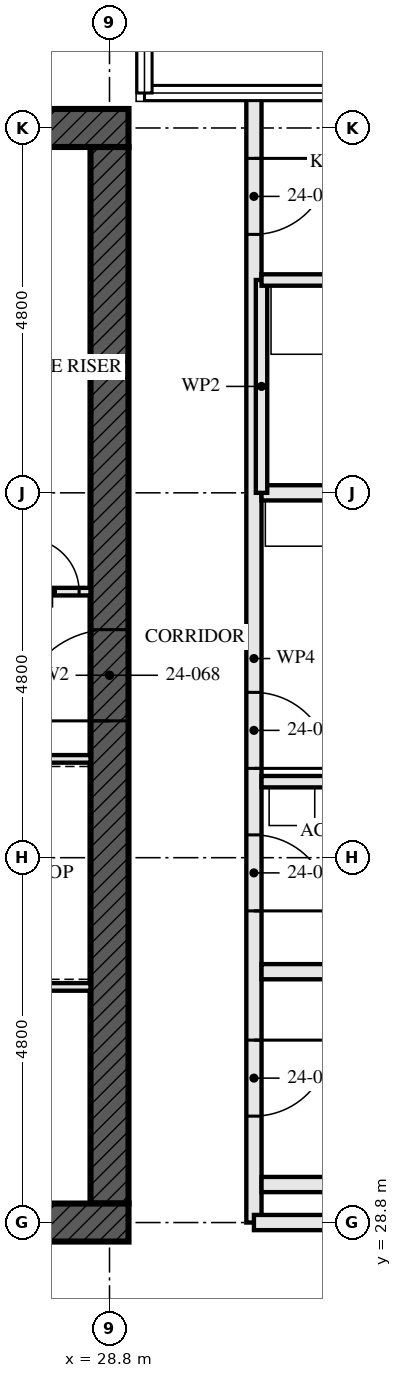
"""IFC4 building model, lengths in metres.
Left out: names, types, materials, properties, quantities, classifications, styles, units other than length and angle.
Written with IfcOpenShell. Run it as: python <this file> out.ifc"""

import sys

from ifc_helpers import new_model, si_unit, direction, frame, frame_2d, origin, place, context, subcontext, project, spatial, rectangle, extrude, element, fill, save


model = new_model("IFC4")
c1 = context("Model", 3, precision=1e-05, world=origin(), true_north=direction((0.0, 1.0)))
c2 = subcontext(c1, "Body", "Model", "MODEL_VIEW")
j1 = project(units=[si_unit("LENGTHUNIT", "METRE"), si_unit("PLANEANGLEUNIT", "RADIAN")], contexts=[c1])
p1 = place(None, origin())
s1 = spatial("IfcSite", under=j1, at=p1, CompositionType="ELEMENT")
p2 = place(p1, origin())
s2 = spatial("IfcBuilding", under=s1, at=p2, CompositionType="ELEMENT")
p3 = place(p2, frame((0.0, 0.0, 91.0)))
s3 = spatial("IfcBuildingStorey", under=s2, at=p3, CompositionType="ELEMENT", Elevation=91.0)
p4 = place(p3, frame((14.15, 28.8, -0.17), z_axis=(0.0, 0.0, 1.0), x_axis=(1.0, 0.0, 0.0)))
e1 = element("IfcWall", 1, at=p4, inside=s3, PredefinedType="SHEAR", context=c2, shape_type="SweptSolid", body=[
    extrude(rectangle(XDim=14.9, YDim=0.5, at=frame_2d((7.45, 0.0))), origin(), (0.0, 0.0, 1.0), 3.5),
])
p5 = place(p4, frame((6.85, 0.0, 0.17)))
e2 = element("IfcOpeningElement", 2, at=p5, cuts=e1, PredefinedType="OPENING", context=c2, shape_type="SweptSolid", body=[
    extrude(rectangle(XDim=1.2, YDim=2.1, at=frame_2d((0.6, 1.05))), frame((0.0, 0.26, 0.0), z_axis=(0.0, -1.0, 0.0), x_axis=(1.0, 0.0, 0.0)), (0.0, 0.0, 1.0), 0.521),
])
p6 = place(p3, frame((29.05, 43.2, -0.17), z_axis=(0.0, 0.0, 1.0), x_axis=(-1.0, 0.0, 0.0)))
e3 = element("IfcWall", 3, at=p6, inside=s3, PredefinedType="SHEAR", context=c2, shape_type="SweptSolid", body=[
    extrude(rectangle(XDim=14.9, YDim=0.5, at=frame_2d((7.45, 0.0))), origin(), (0.0, 0.0, 1.0), 3.5),
])
p7 = place(p6, frame((6.85, 0.0, 0.17)))
e4 = element("IfcOpeningElement", 4, at=p7, cuts=e3, PredefinedType="OPENING", context=c2, shape_type="SweptSolid", body=[
    extrude(rectangle(XDim=1.2, YDim=2.1, at=frame_2d((0.6, 1.05))), frame((0.0, 0.26, 0.0), z_axis=(0.0, -1.0, 0.0), x_axis=(1.0, 0.0, 0.0)), (0.0, 0.0, 1.0), 0.521),
])
p8 = place(p3, frame((28.8, 29.05, -0.17), z_axis=(0.0, 0.0, 1.0), x_axis=(0.0, 1.0, 0.0)))
e5 = element("IfcWall", 5, at=p8, inside=s3, PredefinedType="SHEAR", context=c2, shape_type="SweptSolid", body=[
    extrude(rectangle(XDim=13.9, YDim=0.5, at=frame_2d((6.95, 0.0))), origin(), (0.0, 0.0, 1.0), 3.5),
])
p9 = place(p8, frame((6.35, 0.0, 0.17)))
e6 = element("IfcOpeningElement", 6, at=p9, cuts=e5, PredefinedType="OPENING", context=c2, shape_type="SweptSolid", body=[
    extrude(rectangle(XDim=1.2, YDim=2.1, at=frame_2d((0.6, 1.05))), frame((0.0, 0.26, 0.0), z_axis=(0.0, -1.0, 0.0), x_axis=(1.0, 0.0, 0.0)), (0.0, 0.0, 1.0), 0.521),
])
for number, where, z_axis, x_axis in (
    (7, (35.5, 29.3, 0.0), (0.0, 0.0, 1.0), (-1.0, 0.0, 0.0)),
    (8, (35.5, 32.1, 0.0), (0.0, 0.0, 1.0), (-1.0, 0.0, 0.0)),
):
    element("IfcWall", number, at=place(p3, frame(where, z_axis=z_axis, x_axis=x_axis)), inside=s3, PredefinedType="SOLIDWALL", context=c2, shape_type="SweptSolid", body=[
        extrude(rectangle(XDim=4.7, YDim=0.2, at=frame_2d((2.35, 0.0))), origin(), (0.0, 0.0, 1.0), 2.99),
    ])
p10 = place(p3, frame((33.8, 34.6, 0.0), z_axis=(0.0, 0.0, 1.0), x_axis=(-1.0, 0.0, 0.0)))
e9 = element("IfcWall", 9, at=p10, inside=s3, PredefinedType="PARTITIONING", context=c2, shape_type="SweptSolid", body=[
    extrude(rectangle(XDim=3.0, YDim=0.15, at=frame_2d((1.5, 0.0))), origin(), (0.0, 0.0, 1.0), 3.33),
])
p11 = place(p3, frame((38.055, 38.4, 0.0), z_axis=(0.0, 0.0, 1.0), x_axis=(-1.0, 0.0, 0.0)))
e10 = element("IfcWall", 10, at=p11, inside=s3, PredefinedType="PARTITIONING", context=c2, shape_type="SweptSolid", body=[
    extrude(rectangle(XDim=7.255, YDim=0.2, at=frame_2d((3.627, 0.0))), origin(), (0.0, 0.0, 1.0), 2.55),
])
p12 = place(p3, frame((33.8, 41.2, 0.0), z_axis=(0.0, 0.0, 1.0), x_axis=(-1.0, 0.0, 0.0)))
e11 = element("IfcWall", 11, at=p12, inside=s3, PredefinedType="PARTITIONING", context=c2, shape_type="SweptSolid", body=[
    extrude(rectangle(XDim=3.0, YDim=0.15, at=frame_2d((1.5, 0.0))), origin(), (0.0, 0.0, 1.0), 3.33),
])
p13 = place(p3, frame((30.8, 38.4, 0.0), z_axis=(0.0, 0.0, 1.0), x_axis=(0.0, 1.0, 0.0)))
e12 = element("IfcWall", 12, at=p13, inside=s3, PredefinedType="PARTITIONING", context=c2, shape_type="SweptSolid", body=[
    extrude(rectangle(XDim=2.8, YDim=0.15, at=frame_2d((1.4, 0.0))), origin(), (0.0, 0.0, 1.0), 3.33),
])
p14 = place(p3, frame((30.7, 28.8, 0.0), z_axis=(0.0, 0.0, 1.0), x_axis=(0.0, 1.0, 0.0)))
e13 = element("IfcWall", 13, at=p14, inside=s3, PredefinedType="PARTITIONING", context=c2, shape_type="SweptSolid", body=[
    extrude(rectangle(XDim=14.84, YDim=0.2, at=frame_2d((7.42, 0.0))), origin(), (0.0, 0.0, 1.0), 2.32),
])
p15 = place(p14, frame((1.4, 0.0, 0.0)))
e14 = element("IfcOpeningElement", 14, at=p15, cuts=e13, PredefinedType="OPENING", context=c2, shape_type="SweptSolid", body=[
    extrude(rectangle(XDim=1.0, YDim=2.1, at=frame_2d((0.5, 1.05))), frame((0.0, 0.111, 0.0), z_axis=(0.0, -1.0, 0.0), x_axis=(1.0, 0.0, 0.0)), (0.0, 0.0, 1.0), 0.221),
])
p16 = place(p14, frame((4.1, 0.0, 0.0)))
e15 = element("IfcOpeningElement", 15, at=p16, cuts=e13, PredefinedType="OPENING", context=c2, shape_type="SweptSolid", body=[
    extrude(rectangle(XDim=1.0, YDim=2.1, at=frame_2d((0.5, 1.05))), frame((0.0, 0.111, 0.0), z_axis=(0.0, -1.0, 0.0), x_axis=(1.0, 0.0, 0.0)), (0.0, 0.0, 1.0), 0.221),
])
p17 = place(p14, frame((5.975, 0.0, 0.0)))
e16 = element("IfcOpeningElement", 16, at=p17, cuts=e13, PredefinedType="OPENING", context=c2, shape_type="SweptSolid", body=[
    extrude(rectangle(XDim=1.0, YDim=2.1, at=frame_2d((0.5, 1.05))), frame((0.0, 0.111, 0.0), z_axis=(0.0, -1.0, 0.0), x_axis=(1.0, 0.0, 0.0)), (0.0, 0.0, 1.0), 0.221),
])
p18 = place(p14, frame((13.0, 0.0, 0.0)))
e17 = element("IfcOpeningElement", 17, at=p18, cuts=e13, PredefinedType="OPENING", context=c2, shape_type="SweptSolid", body=[
    extrude(rectangle(XDim=1.0, YDim=2.1, at=frame_2d((0.5, 1.05))), frame((0.0, 0.111, 0.0), z_axis=(0.0, -1.0, 0.0), x_axis=(1.0, 0.0, 0.0)), (0.0, 0.0, 1.0), 0.221),
])
p19 = place(p3, frame((23.05, 34.9, 0.0), z_axis=(0.0, 0.0, 1.0), x_axis=(1.0, 0.0, 0.0)))
e18 = element("IfcWall", 18, at=p19, inside=s3, PredefinedType="SOLIDWALL", context=c2, shape_type="SweptSolid", body=[
    extrude(rectangle(XDim=5.5, YDim=0.1, at=frame_2d((2.75, 0.0))), origin(), (0.0, 0.0, 1.0), 3.33),
])
p20 = place(p3, frame((22.65, 37.1, 0.0), z_axis=(0.0, 0.0, 1.0), x_axis=(1.0, 0.0, 0.0)))
e19 = element("IfcWall", 19, at=p20, inside=s3, PredefinedType="SOLIDWALL", context=c2, shape_type="SweptSolid", body=[
    extrude(rectangle(XDim=5.9, YDim=0.1, at=frame_2d((2.95, 0.0))), origin(), (0.0, 0.0, 1.0), 3.33),
])
p21 = place(p20, frame((3.5, 0.0, 0.0)))
e20 = element("IfcOpeningElement", 20, at=p21, cuts=e19, PredefinedType="OPENING", context=c2, shape_type="SweptSolid", body=[
    extrude(rectangle(XDim=0.9, YDim=2.1, at=frame_2d((0.45, 1.05))), frame((0.0, 0.061, 0.0), z_axis=(0.0, -1.0, 0.0), x_axis=(1.0, 0.0, 0.0)), (0.0, 0.0, 1.0), 0.121),
])
p22 = place(p20, frame((5.05, 0.0, 0.0)))
e21 = element("IfcOpeningElement", 21, at=p22, cuts=e19, PredefinedType="OPENING", context=c2, shape_type="SweptSolid", body=[
    extrude(rectangle(XDim=0.7, YDim=2.1, at=frame_2d((0.35, 1.05))), frame((0.0, 0.061, 0.0), z_axis=(0.0, -1.0, 0.0), x_axis=(1.0, 0.0, 0.0)), (0.0, 0.0, 1.0), 0.121),
])
p23 = place(p3, frame((23.15, 31.9, 0.0), z_axis=(0.0, 0.0, 1.0), x_axis=(1.0, 0.0, 0.0)))
e22 = element("IfcWall", 22, at=p23, inside=s3, PredefinedType="SOLIDWALL", context=c2, shape_type="SweptSolid", body=[
    extrude(rectangle(XDim=5.4, YDim=0.1, at=frame_2d((2.7, 0.0))), origin(), (0.0, 0.0, 1.0), 3.33),
])
p24 = place(p3, frame((33.23, 28.8, 0.0), z_axis=(0.0, 0.0, 1.0), x_axis=(-1.0, 0.0, 0.0)))
e23 = element("IfcWall", 23, at=p24, inside=s3, PredefinedType="PARTITIONING", context=c2, shape_type="SweptSolid", body=[
    extrude(rectangle(XDim=2.53, YDim=0.2, at=frame_2d((1.265, 0.0))), origin(), (0.0, 0.0, 1.0), 2.32),
])
p25 = place(p15, frame((1.0, 0.0, 0.0), z_axis=(0.0, 0.0, 1.0), x_axis=(-1.0, 0.0, 0.0)))
e24 = element("IfcDoor", 24, at=p25, inside=s3, OperationType="SINGLE_SWING_RIGHT", PredefinedType="DOOR", context=c2, shape_type="SweptSolid", body=[
    extrude(rectangle(XDim=1.0, YDim=2.1, at=frame_2d((0.5, 1.05))), frame((0.0, 0.032, 0.0), z_axis=(0.0, -1.0, 0.0), x_axis=(1.0, 0.0, 0.0)), (0.0, 0.0, 1.0), 0.064),
])
fill(e14, e24)
p26 = place(p16, frame((1.0, 0.0, 0.0), z_axis=(0.0, 0.0, 1.0), x_axis=(-1.0, 0.0, 0.0)))
e25 = element("IfcDoor", 25, at=p26, inside=s3, OperationType="SINGLE_SWING_LEFT", PredefinedType="DOOR", context=c2, shape_type="SweptSolid", body=[
    extrude(rectangle(XDim=1.0, YDim=2.1, at=frame_2d((0.5, 1.05))), frame((0.0, 0.027, 0.0), z_axis=(0.0, -1.0, 0.0), x_axis=(1.0, 0.0, 0.0)), (0.0, 0.0, 1.0), 0.054),
])
fill(e15, e25)
p27 = place(p17, frame((1.0, 0.0, 0.0), z_axis=(0.0, 0.0, 1.0), x_axis=(-1.0, 0.0, 0.0)))
e26 = element("IfcDoor", 26, at=p27, inside=s3, OperationType="SINGLE_SWING_LEFT", PredefinedType="DOOR", context=c2, shape_type="SweptSolid", body=[
    extrude(rectangle(XDim=1.0, YDim=2.1, at=frame_2d((0.5, 1.05))), frame((0.0, 0.027, 0.0), z_axis=(0.0, -1.0, 0.0), x_axis=(1.0, 0.0, 0.0)), (0.0, 0.0, 1.0), 0.054),
])
fill(e16, e26)
p28 = place(p18, frame((1.0, 0.0, 0.0), z_axis=(0.0, 0.0, 1.0), x_axis=(-1.0, 0.0, 0.0)))
e27 = element("IfcDoor", 27, at=p28, inside=s3, OperationType="SINGLE_SWING_RIGHT", PredefinedType="DOOR", context=c2, shape_type="SweptSolid", body=[
    extrude(rectangle(XDim=1.0, YDim=2.1, at=frame_2d((0.5, 1.05))), frame((0.0, 0.027, 0.0), z_axis=(0.0, -1.0, 0.0), x_axis=(1.0, 0.0, 0.0)), (0.0, 0.0, 1.0), 0.054),
])
fill(e17, e27)
p29 = place(p22, origin())
e28 = element("IfcDoor", 28, at=p29, inside=s3, OperationType="SINGLE_SWING_RIGHT", PredefinedType="DOOR", context=c2, shape_type="SweptSolid", body=[
    extrude(rectangle(XDim=0.7, YDim=2.1, at=frame_2d((0.35, 1.05))), frame((0.0, 0.027, 0.0), z_axis=(0.0, -1.0, 0.0), x_axis=(1.0, 0.0, 0.0)), (0.0, 0.0, 1.0), 0.054),
])
fill(e21, e28)
p30 = place(p9, origin())
e29 = element("IfcDoor", 29, at=p30, inside=s3, OperationType="SINGLE_SWING_LEFT", PredefinedType="DOOR", context=c2, shape_type="SweptSolid", body=[
    extrude(rectangle(XDim=1.2, YDim=2.1, at=frame_2d((0.6, 1.05))), frame((0.0, 0.027, 0.0), z_axis=(0.0, -1.0, 0.0), x_axis=(1.0, 0.0, 0.0)), (0.0, 0.0, 1.0), 0.054),
])
fill(e6, e29)
save(model, sys.argv[1])
